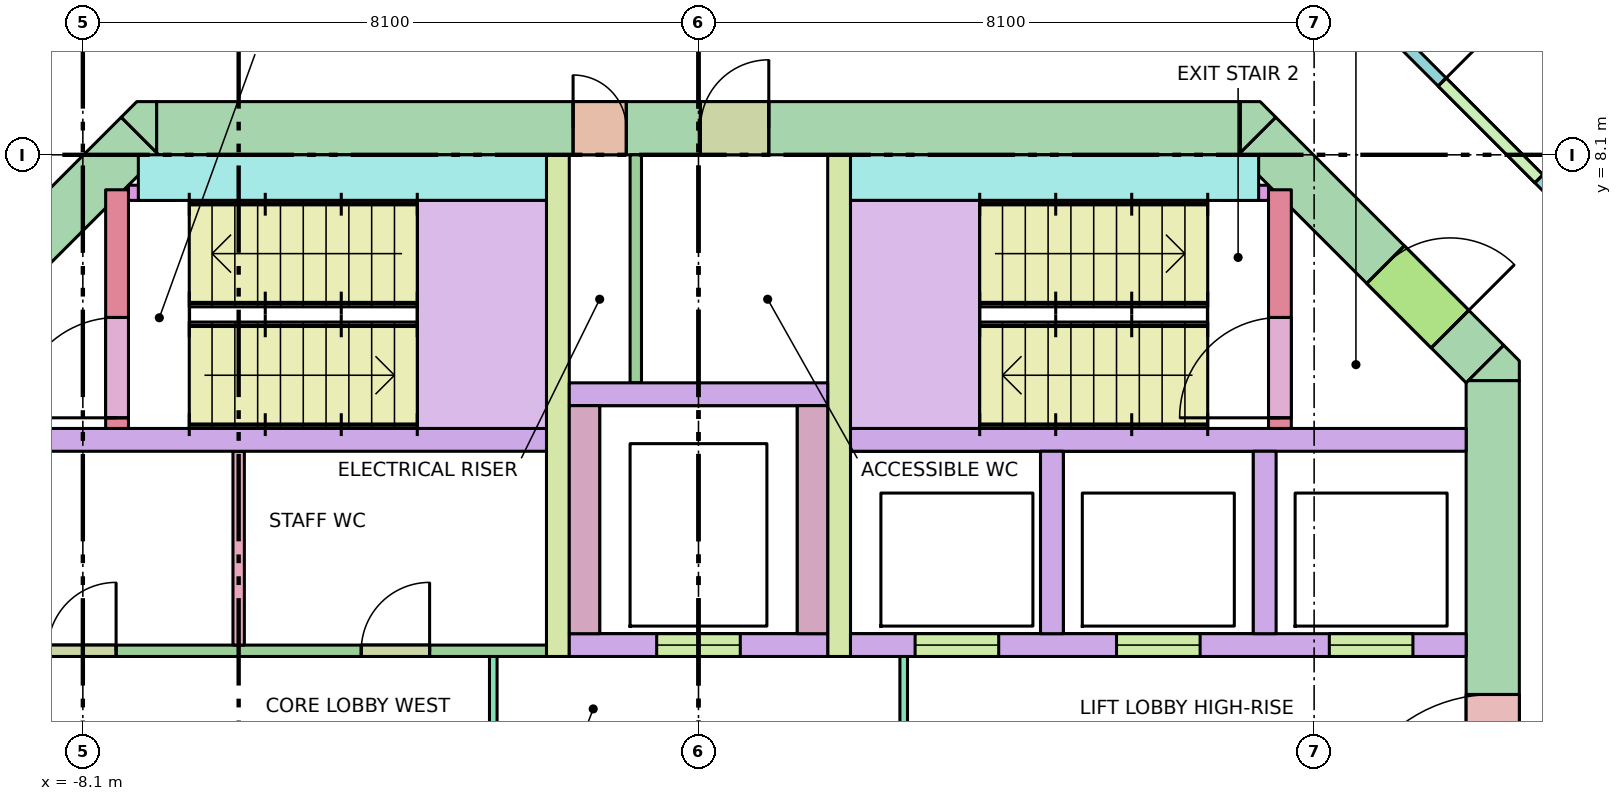
"""IFC4 building model, lengths in metres.
Left out: names, types, materials, properties, quantities, classifications, styles, units other than length and angle.
Written with IfcOpenShell. Run it as: python <this file> out.ifc"""

import sys

from ifc_helpers import new_model, si_unit, direction, frame, frame_2d, origin, place, context, subcontext, project, spatial, polyline, rectangle, outline, extrude, element, fill, save


model = new_model("IFC4")
c1 = context("Model", 3, precision=1e-05, world=origin(), true_north=direction((0.0, 1.0)))
c2 = subcontext(c1, "Body", "Model", "MODEL_VIEW")
j1 = project(units=[si_unit("LENGTHUNIT", "METRE"), si_unit("PLANEANGLEUNIT", "RADIAN")], contexts=[c1])
p1 = place(None, origin())
s1 = spatial("IfcSite", under=j1, at=p1, CompositionType="ELEMENT")
p2 = place(p1, origin())
s2 = spatial("IfcBuilding", under=s1, at=p2, CompositionType="ELEMENT")
p3 = place(p2, frame((0.0, 0.0, 215.0)))
s3 = spatial("IfcBuildingStorey", under=s2, at=p3, CompositionType="ELEMENT", Elevation=215.0)
p4 = place(p3, frame((-7.13, 8.45, -0.28), z_axis=(0.0, 0.0, 1.0), x_axis=(1.0, 0.0, 0.0)))
e1 = element("IfcWall", 1, at=p4, inside=s3, PredefinedType="SHEAR", context=c2, shape_type="SweptSolid", body=[
    extrude(rectangle(XDim=14.26, YDim=0.7, at=frame_2d((7.13, 0.0))), origin(), (0.0, 0.0, 1.0), 3.7),
])
p5 = place(p4, frame((5.48, 0.0, 0.28)))
e2 = element("IfcOpeningElement", 2, at=p5, cuts=e1, PredefinedType="OPENING", context=c2, shape_type="SweptSolid", body=[
    extrude(rectangle(XDim=0.7, YDim=2.1, at=frame_2d((0.35, 1.05))), frame((0.0, 0.36, 0.0), z_axis=(0.0, -1.0, 0.0), x_axis=(1.0, 0.0, 0.0)), (0.0, 0.0, 1.0), 0.72),
])
p6 = place(p4, frame((7.155, 0.0, 0.28)))
e3 = element("IfcOpeningElement", 3, at=p6, cuts=e1, PredefinedType="OPENING", context=c2, shape_type="SweptSolid", body=[
    extrude(rectangle(XDim=0.9, YDim=2.1, at=frame_2d((0.45, 1.05))), frame((0.0, 0.36, 0.0), z_axis=(0.0, -1.0, 0.0), x_axis=(1.0, 0.0, 0.0)), (0.0, 0.0, 1.0), 0.72),
])
p7 = place(p3, frame((10.45, -5.13, -0.28), z_axis=(0.0, 0.0, 1.0), x_axis=(0.0, 1.0, 0.0)))
e4 = element("IfcWall", 4, at=p7, inside=s3, PredefinedType="SHEAR", context=c2, shape_type="SweptSolid", body=[
    extrude(rectangle(XDim=10.26, YDim=0.7, at=frame_2d((5.13, 0.0))), origin(), (0.0, 0.0, 1.0), 3.7),
])
p8 = place(p7, frame((4.13, 0.0, 0.28)))
e5 = element("IfcOpeningElement", 5, at=p8, cuts=e4, PredefinedType="OPENING", context=c2, shape_type="SweptSolid", body=[
    extrude(rectangle(XDim=2.0, YDim=2.1, at=frame_2d((1.0, 1.05))), frame((0.0, 0.36, 0.0), z_axis=(0.0, -1.0, 0.0), x_axis=(1.0, 0.0, 0.0)), (0.0, 0.0, 1.0), 0.72),
])
p9 = place(p3, frame((-10.347, 5.347, -0.28), z_axis=(0.0, 0.0, 1.0), x_axis=(0.707106781187, 0.707106781187, 0.0)))
e6 = element("IfcWall", 6, at=p9, inside=s3, PredefinedType="SHEAR", context=c2, shape_type="SweptSolid", body=[
    extrude(rectangle(XDim=4.243, YDim=0.7, at=frame_2d((2.121, 0.0))), origin(), (0.0, 0.0, 1.0), 3.7),
])
p10 = place(p9, frame((0.65, 0.0, 0.28)))
e7 = element("IfcOpeningElement", 7, at=p10, cuts=e6, PredefinedType="OPENING", context=c2, shape_type="SweptSolid", body=[
    extrude(rectangle(XDim=1.2, YDim=2.1, at=frame_2d((0.6, 1.05))), frame((0.0, 0.36, 0.0), z_axis=(0.0, -1.0, 0.0), x_axis=(1.0, 0.0, 0.0)), (0.0, 0.0, 1.0), 0.72),
])
p11 = place(p3, frame((7.347, 8.347, -0.28), z_axis=(0.0, 0.0, 1.0), x_axis=(0.707106781187, -0.707106781187, 0.0)))
e8 = element("IfcWall", 8, at=p11, inside=s3, PredefinedType="SHEAR", context=c2, shape_type="SweptSolid", body=[
    extrude(rectangle(XDim=4.243, YDim=0.7, at=frame_2d((2.121, 0.0))), origin(), (0.0, 0.0, 1.0), 3.7),
])
p12 = place(p11, frame((2.393, 0.0, 0.28)))
e9 = element("IfcOpeningElement", 9, at=p12, cuts=e8, PredefinedType="OPENING", context=c2, shape_type="SweptSolid", body=[
    extrude(rectangle(XDim=1.2, YDim=2.1, at=frame_2d((0.6, 1.05))), frame((0.0, 0.36, 0.0), z_axis=(0.0, -1.0, 0.0), x_axis=(1.0, 0.0, 0.0)), (0.0, 0.0, 1.0), 0.72),
])
p13 = place(p3, frame((0.0, 0.0, -0.28)))
e10 = element("IfcWall", 10, at=p13, inside=s3, PredefinedType="SHEAR", context=c2, shape_type="SweptSolid", body=[
    extrude(outline(polyline([(10.8, 5.39), (10.8, 5.13), (10.8, 5.13), (10.13, 5.13), (10.595, 5.595), (10.595, 5.595), (10.595, 5.595), (10.8, 5.39)])), origin(), (0.0, 0.0, 1.0), 3.7),
])
p14 = place(p3, frame((0.0, 0.0, -0.28)))
e11 = element("IfcWall", 11, at=p14, inside=s3, PredefinedType="SHEAR", context=c2, shape_type="SweptSolid", body=[
    extrude(outline(polyline([(-7.39, 8.8), (-7.13, 8.8), (-7.13, 8.8), (-7.13, 8.13), (-7.595, 8.595), (-7.595, 8.595), (-7.595, 8.595), (-7.39, 8.8)])), origin(), (0.0, 0.0, 1.0), 3.7),
])
p15 = place(p3, frame((0.0, 0.0, -0.28)))
e12 = element("IfcWall", 12, at=p15, inside=s3, PredefinedType="SHEAR", context=c2, shape_type="SweptSolid", body=[
    extrude(outline(polyline([(7.39, 8.8), (7.595, 8.595), (7.595, 8.595), (7.595, 8.595), (7.13, 8.13), (7.13, 8.8), (7.13, 8.8), (7.39, 8.8)])), origin(), (0.0, 0.0, 1.0), 3.7),
])
for number, where, z_axis, x_axis in (
    (13, (-10.1, 4.35, 0.0), (0.0, 0.0, 1.0), (1.0, 0.0, 0.0)),
    (14, (2.0, 4.35, 0.0), (0.0, 0.0, 1.0), (1.0, 0.0, 0.0)),
):
    element("IfcWall", number, at=place(p3, frame(where, z_axis=z_axis, x_axis=x_axis)), inside=s3, PredefinedType="SOLIDWALL", context=c2, shape_type="SweptSolid", body=[
        extrude(rectangle(XDim=8.1, YDim=0.3, at=frame_2d((4.05, 0.0))), origin(), (0.0, 0.0, 1.0), 3.42),
    ])
p16 = place(p3, frame((2.0, 1.65, 0.0), z_axis=(0.0, 0.0, 1.0), x_axis=(1.0, 0.0, 0.0)))
e15 = element("IfcWall", 15, at=p16, inside=s3, PredefinedType="SOLIDWALL", context=c2, shape_type="SweptSolid", body=[
    extrude(rectangle(XDim=8.1, YDim=0.3, at=frame_2d((4.05, 0.0))), origin(), (0.0, 0.0, 1.0), 3.42),
])
p17 = place(p16, frame((0.85, 0.0, 0.0)))
e16 = element("IfcOpeningElement", 16, at=p17, cuts=e15, PredefinedType="OPENING", context=c2, shape_type="SweptSolid", body=[
    extrude(rectangle(XDim=1.1, YDim=2.1, at=frame_2d((0.55, 1.05))), frame((0.0, 0.16, 0.0), z_axis=(0.0, -1.0, 0.0), x_axis=(1.0, 0.0, 0.0)), (0.0, 0.0, 1.0), 0.32),
])
p18 = place(p16, frame((3.5, 0.0, 0.0)))
e17 = element("IfcOpeningElement", 17, at=p18, cuts=e15, PredefinedType="OPENING", context=c2, shape_type="SweptSolid", body=[
    extrude(rectangle(XDim=1.1, YDim=2.1, at=frame_2d((0.55, 1.05))), frame((0.0, 0.16, 0.0), z_axis=(0.0, -1.0, 0.0), x_axis=(1.0, 0.0, 0.0)), (0.0, 0.0, 1.0), 0.32),
])
p19 = place(p16, frame((6.3, 0.0, 0.0)))
e18 = element("IfcOpeningElement", 18, at=p19, cuts=e15, PredefinedType="OPENING", context=c2, shape_type="SweptSolid", body=[
    extrude(rectangle(XDim=1.1, YDim=2.1, at=frame_2d((0.55, 1.05))), frame((0.0, 0.16, 0.0), z_axis=(0.0, -1.0, 0.0), x_axis=(1.0, 0.0, 0.0)), (0.0, 0.0, 1.0), 0.32),
])
for number, where, z_axis, x_axis in (
    (19, (4.65, 1.8, 0.0), (0.0, 0.0, 1.0), (0.0, 1.0, 0.0)),
    (20, (7.45, 1.8, 0.0), (0.0, 0.0, 1.0), (0.0, 1.0, 0.0)),
):
    element("IfcWall", number, at=place(p3, frame(where, z_axis=z_axis, x_axis=x_axis)), inside=s3, PredefinedType="SOLIDWALL", context=c2, shape_type="SweptSolid", body=[
        extrude(rectangle(XDim=2.4, YDim=0.3, at=frame_2d((1.2, 0.0))), origin(), (0.0, 0.0, 1.0), 3.42),
    ])
for number, where, z_axis, x_axis in (
    (21, (-1.85, 1.5, 0.0), (0.0, 0.0, 1.0), (0.0, 1.0, 0.0)),
    (22, (1.85, 1.5, 0.0), (0.0, 0.0, 1.0), (0.0, 1.0, 0.0)),
):
    element("IfcWall", number, at=place(p3, frame(where, z_axis=z_axis, x_axis=x_axis)), inside=s3, PredefinedType="SHEAR", context=c2, shape_type="SweptSolid", body=[
        extrude(rectangle(XDim=6.6, YDim=0.3, at=frame_2d((3.3, 0.0))), origin(), (0.0, 0.0, 1.0), 3.42),
    ])
p20 = place(p3, frame((-1.7, 1.65, 0.0), z_axis=(0.0, 0.0, 1.0), x_axis=(1.0, 0.0, 0.0)))
e23 = element("IfcWall", 23, at=p20, inside=s3, PredefinedType="SOLIDWALL", context=c2, shape_type="SweptSolid", body=[
    extrude(rectangle(XDim=3.4, YDim=0.3, at=frame_2d((1.7, 0.0))), origin(), (0.0, 0.0, 1.0), 3.42),
])
p21 = place(p20, frame((1.15, 0.0, 0.0)))
e24 = element("IfcOpeningElement", 24, at=p21, cuts=e23, PredefinedType="OPENING", context=c2, shape_type="SweptSolid", body=[
    extrude(rectangle(XDim=1.1, YDim=2.1, at=frame_2d((0.55, 1.05))), frame((0.0, 0.16, 0.0), z_axis=(0.0, -1.0, 0.0), x_axis=(1.0, 0.0, 0.0)), (0.0, 0.0, 1.0), 0.32),
])
for number, where, z_axis, x_axis in (
    (25, (-1.5, 1.8, 0.0), (0.0, 0.0, 1.0), (0.0, 1.0, 0.0)),
    (26, (1.5, 1.8, 0.0), (0.0, 0.0, 1.0), (0.0, 1.0, 0.0)),
):
    element("IfcWall", number, at=place(p3, frame(where, z_axis=z_axis, x_axis=x_axis)), inside=s3, PredefinedType="SOLIDWALL", context=c2, shape_type="SweptSolid", body=[
        extrude(rectangle(XDim=3.0, YDim=0.4, at=frame_2d((1.5, 0.0))), origin(), (0.0, 0.0, 1.0), 3.42),
    ])
p22 = place(p3, frame((-1.7, 4.95, 0.0), z_axis=(0.0, 0.0, 1.0), x_axis=(1.0, 0.0, 0.0)))
e27 = element("IfcWall", 27, at=p22, inside=s3, PredefinedType="SOLIDWALL", context=c2, shape_type="SweptSolid", body=[
    extrude(rectangle(XDim=3.4, YDim=0.3, at=frame_2d((1.7, 0.0))), origin(), (0.0, 0.0, 1.0), 3.42),
])
p23 = place(p3, frame((-7.65, 4.5, 0.0), z_axis=(0.0, 0.0, 1.0), x_axis=(0.0, 1.0, 0.0)))
e28 = element("IfcWall", 28, at=p23, inside=s3, PredefinedType="SHEAR", context=c2, shape_type="SweptSolid", body=[
    extrude(rectangle(XDim=3.14, YDim=0.3, at=frame_2d((1.57, 0.0))), origin(), (0.0, 0.0, 1.0), 3.42),
])
p24 = place(p23, frame((0.14, 0.0, 0.0)))
e29 = element("IfcOpeningElement", 29, at=p24, cuts=e28, PredefinedType="OPENING", context=c2, shape_type="SweptSolid", body=[
    extrude(rectangle(XDim=1.32, YDim=2.1, at=frame_2d((0.66, 1.05))), frame((0.0, 0.16, 0.0), z_axis=(0.0, -1.0, 0.0), x_axis=(1.0, 0.0, 0.0)), (0.0, 0.0, 1.0), 0.32),
])
p25 = place(p3, frame((-7.37, 7.8, 0.0), z_axis=(0.0, 0.0, 1.0), x_axis=(1.0, 0.0, 0.0)))
e30 = element("IfcWall", 30, at=p25, inside=s3, PredefinedType="SHEAR", context=c2, shape_type="SweptSolid", body=[
    extrude(rectangle(XDim=5.37, YDim=0.6, at=frame_2d((2.685, 0.0))), origin(), (0.0, 0.0, 1.0), 3.42),
])
p26 = place(p3, frame((7.65, 4.5, 0.0), z_axis=(0.0, 0.0, 1.0), x_axis=(0.0, 1.0, 0.0)))
e31 = element("IfcWall", 31, at=p26, inside=s3, PredefinedType="SHEAR", context=c2, shape_type="SweptSolid", body=[
    extrude(rectangle(XDim=3.14, YDim=0.3, at=frame_2d((1.57, 0.0))), origin(), (0.0, 0.0, 1.0), 3.42),
])
p27 = place(p26, frame((0.14, 0.0, 0.0)))
e32 = element("IfcOpeningElement", 32, at=p27, cuts=e31, PredefinedType="OPENING", context=c2, shape_type="SweptSolid", body=[
    extrude(rectangle(XDim=1.32, YDim=2.1, at=frame_2d((0.66, 1.05))), frame((0.0, 0.16, 0.0), z_axis=(0.0, -1.0, 0.0), x_axis=(1.0, 0.0, 0.0)), (0.0, 0.0, 1.0), 0.32),
])
p28 = place(p3, frame((2.0, 7.8, 0.0), z_axis=(0.0, 0.0, 1.0), x_axis=(1.0, 0.0, 0.0)))
e33 = element("IfcWall", 33, at=p28, inside=s3, PredefinedType="SHEAR", context=c2, shape_type="SweptSolid", body=[
    extrude(rectangle(XDim=5.37, YDim=0.6, at=frame_2d((2.685, 0.0))), origin(), (0.0, 0.0, 1.0), 3.42),
])
for number, where, z_axis, x_axis in (
    (34, (-7.5, 7.6, 0.0), (0.0, 0.0, 1.0), (1.0, 0.0, 0.0)),
    (35, (6.9, 7.6, 0.0), (0.0, 0.0, 1.0), (1.0, 0.0, 0.0)),
):
    element("IfcWall", number, at=place(p3, frame(where, z_axis=z_axis, x_axis=x_axis)), inside=s3, PredefinedType="SHEAR", context=c2, shape_type="SweptSolid", body=[
        extrude(rectangle(XDim=0.6, YDim=0.2, at=frame_2d((0.3, 0.0))), origin(), (0.0, 0.0, 1.0), 3.42),
    ])
p29 = place(p3, frame((-2.7, -1.5, 0.0), z_axis=(0.0, 0.0, 1.0), x_axis=(0.0, 1.0, 0.0)))
e36 = element("IfcWall", 36, at=p29, inside=s3, PredefinedType="PARTITIONING", context=c2, shape_type="SweptSolid", body=[
    extrude(rectangle(XDim=3.0, YDim=0.1, at=frame_2d((1.5, 0.0))), origin(), (0.0, 0.0, 1.0), 3.42),
])
p30 = place(p29, frame((0.9, 0.0, 0.0)))
e37 = element("IfcOpeningElement", 37, at=p30, cuts=e36, PredefinedType="OPENING", context=c2, shape_type="SweptSolid", body=[
    extrude(rectangle(XDim=1.2, YDim=2.1, at=frame_2d((0.6, 1.05))), frame((0.0, 0.06, 0.0), z_axis=(0.0, -1.0, 0.0), x_axis=(1.0, 0.0, 0.0)), (0.0, 0.0, 1.0), 0.12),
])
p31 = place(p3, frame((2.7, -1.5, 0.0), z_axis=(0.0, 0.0, 1.0), x_axis=(0.0, 1.0, 0.0)))
e38 = element("IfcWall", 38, at=p31, inside=s3, PredefinedType="PARTITIONING", context=c2, shape_type="SweptSolid", body=[
    extrude(rectangle(XDim=3.0, YDim=0.1, at=frame_2d((1.5, 0.0))), origin(), (0.0, 0.0, 1.0), 3.42),
])
p32 = place(p31, frame((0.9, 0.0, 0.0)))
e39 = element("IfcOpeningElement", 39, at=p32, cuts=e38, PredefinedType="OPENING", context=c2, shape_type="SweptSolid", body=[
    extrude(rectangle(XDim=1.2, YDim=2.1, at=frame_2d((0.6, 1.05))), frame((0.0, 0.06, 0.0), z_axis=(0.0, -1.0, 0.0), x_axis=(1.0, 0.0, 0.0)), (0.0, 0.0, 1.0), 0.12),
])
p33 = place(p3, frame((-0.825, 5.1, 0.0), z_axis=(0.0, 0.0, 1.0), x_axis=(0.0, 1.0, 0.0)))
e40 = element("IfcWall", 40, at=p33, inside=s3, PredefinedType="PARTITIONING", context=c2, shape_type="SweptSolid", body=[
    extrude(rectangle(XDim=3.0, YDim=0.15, at=frame_2d((1.5, 0.0))), origin(), (0.0, 0.0, 1.0), 3.42),
])
p34 = place(p3, frame((-6.05, 1.65, 0.0), z_axis=(0.0, 0.0, 1.0), x_axis=(0.0, 1.0, 0.0)))
e41 = element("IfcWall", 41, at=p34, inside=s3, PredefinedType="PARTITIONING", context=c2, shape_type="SweptSolid", body=[
    extrude(rectangle(XDim=2.55, YDim=0.15, at=frame_2d((1.275, 0.0))), origin(), (0.0, 0.0, 1.0), 3.42),
])
p35 = place(p3, frame((-10.1, 1.575, 0.0), z_axis=(0.0, 0.0, 1.0), x_axis=(1.0, 0.0, 0.0)))
e42 = element("IfcWall", 42, at=p35, inside=s3, PredefinedType="PARTITIONING", context=c2, shape_type="SweptSolid", body=[
    extrude(rectangle(XDim=8.1, YDim=0.15, at=frame_2d((4.05, 0.0))), origin(), (0.0, 0.0, 1.0), 3.42),
])
p36 = place(p35, frame((1.538, 0.0, 0.0)))
e43 = element("IfcOpeningElement", 43, at=p36, cuts=e42, PredefinedType="OPENING", context=c2, shape_type="SweptSolid", body=[
    extrude(rectangle(XDim=0.9, YDim=2.1, at=frame_2d((0.45, 1.05))), frame((0.0, 0.085, 0.0), z_axis=(0.0, -1.0, 0.0), x_axis=(1.0, 0.0, 0.0)), (0.0, 0.0, 1.0), 0.17),
])
p37 = place(p35, frame((5.663, 0.0, 0.0)))
e44 = element("IfcOpeningElement", 44, at=p37, cuts=e42, PredefinedType="OPENING", context=c2, shape_type="SweptSolid", body=[
    extrude(rectangle(XDim=0.9, YDim=2.1, at=frame_2d((0.45, 1.05))), frame((0.0, 0.085, 0.0), z_axis=(0.0, -1.0, 0.0), x_axis=(1.0, 0.0, 0.0)), (0.0, 0.0, 1.0), 0.17),
])
p38 = place(p3, frame((-12.638, 6.204, 0.0), z_axis=(0.0, 0.0, 1.0), x_axis=(0.707106781187, 0.707106781187, 0.0)))
e45 = element("IfcWall", 45, at=p38, inside=s3, PredefinedType="PARTITIONING", context=c2, shape_type="SweptSolid", body=[
    extrude(rectangle(XDim=6.271, YDim=0.15, at=frame_2d((3.135, 0.0))), origin(), (0.0, 0.0, 1.0), 2.52),
])
p39 = place(p38, frame((4.935, 0.0, 0.0)))
e46 = element("IfcOpeningElement", 46, at=p39, cuts=e45, PredefinedType="OPENING", context=c2, shape_type="SweptSolid", body=[
    extrude(rectangle(XDim=0.9, YDim=2.1, at=frame_2d((0.45, 1.05))), frame((0.0, 0.085, 0.0), z_axis=(0.0, -1.0, 0.0), x_axis=(1.0, 0.0, 0.0)), (0.0, 0.0, 1.0), 0.17),
])
p40 = place(p38, frame((2.314, 0.0, 0.0)))
e47 = element("IfcOpeningElement", 47, at=p40, cuts=e45, PredefinedType="OPENING", context=c2, shape_type="SweptSolid", body=[
    extrude(rectangle(XDim=0.9, YDim=2.1, at=frame_2d((0.45, 1.05))), frame((0.0, 0.085, 0.0), z_axis=(0.0, -1.0, 0.0), x_axis=(1.0, 0.0, 0.0)), (0.0, 0.0, 1.0), 0.17),
])
p41 = place(p3, frame((8.204, 10.638, 0.0), z_axis=(0.0, 0.0, 1.0), x_axis=(0.707106781187, -0.707106781187, 0.0)))
e48 = element("IfcWall", 48, at=p41, inside=s3, PredefinedType="PARTITIONING", context=c2, shape_type="SweptSolid", body=[
    extrude(rectangle(XDim=6.271, YDim=0.15, at=frame_2d((3.135, 0.0))), origin(), (0.0, 0.0, 1.0), 2.52),
])
p42 = place(p41, frame((2.235, 0.0, 0.0)))
e49 = element("IfcOpeningElement", 49, at=p42, cuts=e48, PredefinedType="OPENING", context=c2, shape_type="SweptSolid", body=[
    extrude(rectangle(XDim=1.8, YDim=2.1, at=frame_2d((0.9, 1.05))), frame((0.0, 0.085, 0.0), z_axis=(0.0, -1.0, 0.0), x_axis=(1.0, 0.0, 0.0)), (0.0, 0.0, 1.0), 0.17),
])
p43 = place(p17, origin())
e50 = element("IfcDoor", 50, at=p43, inside=s3, OperationType="DOUBLE_DOOR_SLIDING", PredefinedType="DOOR", context=c2, shape_type="SweptSolid", body=[
    extrude(rectangle(XDim=1.1, YDim=2.1, at=frame_2d((0.55, 1.05))), frame((0.0, 0.025, 0.0), z_axis=(0.0, -1.0, 0.0), x_axis=(1.0, 0.0, 0.0)), (0.0, 0.0, 1.0), 0.05),
])
fill(e16, e50)
p44 = place(p18, origin())
e51 = element("IfcDoor", 51, at=p44, inside=s3, OperationType="DOUBLE_DOOR_SLIDING", PredefinedType="DOOR", context=c2, shape_type="SweptSolid", body=[
    extrude(rectangle(XDim=1.1, YDim=2.1, at=frame_2d((0.55, 1.05))), frame((0.0, 0.025, 0.0), z_axis=(0.0, -1.0, 0.0), x_axis=(1.0, 0.0, 0.0)), (0.0, 0.0, 1.0), 0.05),
])
fill(e17, e51)
p45 = place(p19, origin())
e52 = element("IfcDoor", 52, at=p45, inside=s3, OperationType="DOUBLE_DOOR_SLIDING", PredefinedType="DOOR", context=c2, shape_type="SweptSolid", body=[
    extrude(rectangle(XDim=1.1, YDim=2.1, at=frame_2d((0.55, 1.05))), frame((0.0, 0.025, 0.0), z_axis=(0.0, -1.0, 0.0), x_axis=(1.0, 0.0, 0.0)), (0.0, 0.0, 1.0), 0.05),
])
fill(e18, e52)
p46 = place(p21, origin())
e53 = element("IfcDoor", 53, at=p46, inside=s3, OperationType="DOUBLE_DOOR_SLIDING", PredefinedType="DOOR", context=c2, shape_type="SweptSolid", body=[
    extrude(rectangle(XDim=1.1, YDim=2.1, at=frame_2d((0.55, 1.05))), frame((0.0, 0.025, 0.0), z_axis=(0.0, -1.0, 0.0), x_axis=(1.0, 0.0, 0.0)), (0.0, 0.0, 1.0), 0.05),
])
fill(e24, e53)
p47 = place(p24, origin())
e54 = element("IfcDoor", 54, at=p47, inside=s3, OperationType="DOUBLE_DOOR_SINGLE_SWING", PredefinedType="DOOR", context=c2, shape_type="SweptSolid", body=[
    extrude(rectangle(XDim=1.32, YDim=2.1, at=frame_2d((0.66, 1.05))), frame((0.0, 0.025, 0.0), z_axis=(0.0, -1.0, 0.0), x_axis=(1.0, 0.0, 0.0)), (0.0, 0.0, 1.0), 0.05),
])
fill(e29, e54)
p48 = place(p27, origin())
e55 = element("IfcDoor", 55, at=p48, inside=s3, OperationType="DOUBLE_DOOR_SINGLE_SWING", PredefinedType="DOOR", context=c2, shape_type="SweptSolid", body=[
    extrude(rectangle(XDim=1.32, YDim=2.1, at=frame_2d((0.66, 1.05))), frame((0.0, 0.025, 0.0), z_axis=(0.0, -1.0, 0.0), x_axis=(1.0, 0.0, 0.0)), (0.0, 0.0, 1.0), 0.05),
])
fill(e32, e55)
p49 = place(p12, origin())
e56 = element("IfcDoor", 56, at=p49, inside=s3, OperationType="SINGLE_SWING_RIGHT", PredefinedType="DOOR", context=c2, shape_type="SweptSolid", body=[
    extrude(rectangle(XDim=1.2, YDim=2.1, at=frame_2d((0.6, 1.05))), frame((0.0, 0.025, 0.0), z_axis=(0.0, -1.0, 0.0), x_axis=(1.0, 0.0, 0.0)), (0.0, 0.0, 1.0), 0.05),
])
fill(e9, e56)
p50 = place(p8, origin())
e57 = element("IfcDoor", 57, at=p50, inside=s3, OperationType="DOUBLE_DOOR_SINGLE_SWING", PredefinedType="DOOR", context=c2, shape_type="SweptSolid", body=[
    extrude(rectangle(XDim=2.0, YDim=2.1, at=frame_2d((1.0, 1.05))), frame((0.0, 0.025, 0.0), z_axis=(0.0, -1.0, 0.0), x_axis=(1.0, 0.0, 0.0)), (0.0, 0.0, 1.0), 0.05),
])
fill(e5, e57)
p51 = place(p5, origin())
e58 = element("IfcDoor", 58, at=p51, inside=s3, OperationType="SINGLE_SWING_LEFT", PredefinedType="DOOR", context=c2, shape_type="SweptSolid", body=[
    extrude(rectangle(XDim=0.7, YDim=2.1, at=frame_2d((0.35, 1.05))), frame((0.0, 0.025, 0.0), z_axis=(0.0, -1.0, 0.0), x_axis=(1.0, 0.0, 0.0)), (0.0, 0.0, 1.0), 0.05),
])
fill(e2, e58)
p52 = place(p6, origin())
e59 = element("IfcDoor", 59, at=p52, inside=s3, OperationType="SINGLE_SWING_RIGHT", PredefinedType="DOOR", context=c2, shape_type="SweptSolid", body=[
    extrude(rectangle(XDim=0.9, YDim=2.1, at=frame_2d((0.45, 1.05))), frame((0.0, 0.025, 0.0), z_axis=(0.0, -1.0, 0.0), x_axis=(1.0, 0.0, 0.0)), (0.0, 0.0, 1.0), 0.05),
])
fill(e3, e59)
p53 = place(p36, origin())
e60 = element("IfcDoor", 60, at=p53, inside=s3, OperationType="SINGLE_SWING_RIGHT", PredefinedType="DOOR", context=c2, shape_type="SweptSolid", body=[
    extrude(rectangle(XDim=0.9, YDim=2.1, at=frame_2d((0.45, 1.05))), frame((0.0, 0.025, 0.0), z_axis=(0.0, -1.0, 0.0), x_axis=(1.0, 0.0, 0.0)), (0.0, 0.0, 1.0), 0.05),
])
fill(e43, e60)
p54 = place(p37, origin())
e61 = element("IfcDoor", 61, at=p54, inside=s3, OperationType="SINGLE_SWING_RIGHT", PredefinedType="DOOR", context=c2, shape_type="SweptSolid", body=[
    extrude(rectangle(XDim=0.9, YDim=2.1, at=frame_2d((0.45, 1.05))), frame((0.0, 0.025, 0.0), z_axis=(0.0, -1.0, 0.0), x_axis=(1.0, 0.0, 0.0)), (0.0, 0.0, 1.0), 0.05),
])
fill(e44, e61)
p55 = place(p42, origin())
e62 = element("IfcDoor", 62, at=p55, inside=s3, OperationType="DOUBLE_DOOR_SINGLE_SWING", PredefinedType="DOOR", context=c2, shape_type="SweptSolid", body=[
    extrude(rectangle(XDim=1.8, YDim=2.1, at=frame_2d((0.9, 1.05))), frame((0.0, 0.025, 0.0), z_axis=(0.0, -1.0, 0.0), x_axis=(1.0, 0.0, 0.0)), (0.0, 0.0, 1.0), 0.05),
])
fill(e49, e62)
save(model, sys.argv[1])
